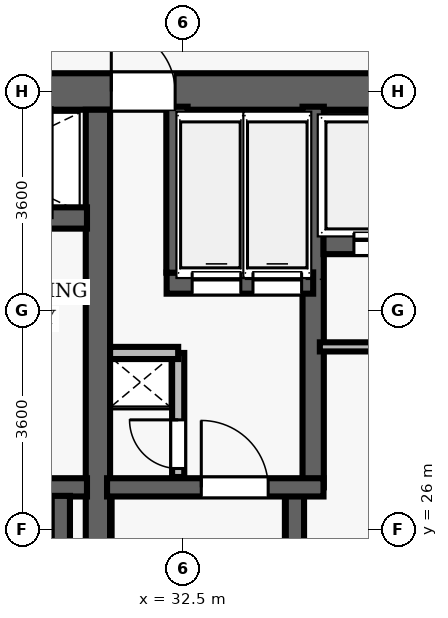
"""IFC4 building model, lengths in metres.
Left out: names, types, materials, properties, quantities, classifications, styles, units other than length and angle.
Written with IfcOpenShell. Run it as: python <this file> out.ifc"""

import sys

from ifc_helpers import new_model, si_unit, direction, frame, frame_2d, origin, place, context, subcontext, project, spatial, rectangle, extrude, element, fill, save


model = new_model("IFC4")
c1 = context("Model", 3, precision=1e-05, world=origin(), true_north=direction((0.0, 1.0)))
c2 = subcontext(c1, "Body", "Model", "MODEL_VIEW")
j1 = project(units=[si_unit("LENGTHUNIT", "METRE"), si_unit("PLANEANGLEUNIT", "RADIAN")], contexts=[c1])
p1 = place(None, origin())
s1 = spatial("IfcSite", under=j1, at=p1, CompositionType="ELEMENT")
p2 = place(p1, origin())
s2 = spatial("IfcBuilding", under=s1, at=p2, CompositionType="ELEMENT")
p3 = place(p2, frame((0.0, 0.0, 93.9)))
s3 = spatial("IfcBuildingStorey", under=s2, at=p3, CompositionType="ELEMENT", Elevation=93.9)
p4 = place(p3, frame((26.7, 33.2, 0.0), z_axis=(0.0, 0.0, 1.0), x_axis=(1.0, 0.0, 0.0)))
e1 = element("IfcWall", 1, at=p4, inside=s3, PredefinedType="SHEAR", context=c2, shape_type="SweptSolid", body=[
    extrude(rectangle(XDim=22.6, YDim=0.6, at=frame_2d((11.3, 0.0))), origin(), (0.0, 0.0, 1.0), 3.5),
])
p5 = place(p4, frame((4.62, 0.0, 0.0)))
e2 = element("IfcOpeningElement", 2, at=p5, cuts=e1, PredefinedType="OPENING", context=c2, shape_type="SweptSolid", body=[
    extrude(rectangle(XDim=1.05, YDim=2.15, at=frame_2d((0.525, 1.075))), frame((0.0, 0.31, 0.0), z_axis=(0.0, -1.0, 0.0), x_axis=(1.0, 0.0, 0.0)), (0.0, 0.0, 1.0), 0.62),
])
p6 = place(p4, frame((14.52, 0.0, 0.0)))
e3 = element("IfcOpeningElement", 3, at=p6, cuts=e1, PredefinedType="OPENING", context=c2, shape_type="SweptSolid", body=[
    extrude(rectangle(XDim=1.05, YDim=2.15, at=frame_2d((0.525, 1.075))), frame((0.0, 0.31, 0.0), z_axis=(0.0, -1.0, 0.0), x_axis=(1.0, 0.0, 0.0)), (0.0, 0.0, 1.0), 0.62),
])
p7 = place(p3, frame((31.1, 19.1, 0.0), z_axis=(0.0, 0.0, 1.0), x_axis=(0.0, 1.0, 0.0)))
e4 = element("IfcWall", 4, at=p7, inside=s3, PredefinedType="SHEAR", context=c2, shape_type="SweptSolid", body=[
    extrude(rectangle(XDim=13.8, YDim=0.4, at=frame_2d((6.9, 0.0))), origin(), (0.0, 0.0, 1.0), 3.5),
])
p8 = place(p3, frame((27.25, 26.69, 0.0), z_axis=(0.0, 0.0, 1.0), x_axis=(1.0, 0.0, 0.0)))
e5 = element("IfcWall", 5, at=p8, inside=s3, PredefinedType="SHEAR", context=c2, shape_type="SweptSolid", body=[
    extrude(rectangle(XDim=3.67, YDim=0.3, at=frame_2d((1.835, 0.0))), origin(), (0.0, 0.0, 1.0), 3.5),
])
p9 = place(p8, frame((1.05, 0.0, 0.0)))
e6 = element("IfcOpeningElement", 6, at=p9, cuts=e5, PredefinedType="OPENING", context=c2, shape_type="SweptSolid", body=[
    extrude(rectangle(XDim=1.1, YDim=2.15, at=frame_2d((0.55, 1.075))), frame((0.0, 0.16, 0.0), z_axis=(0.0, -1.0, 0.0), x_axis=(1.0, 0.0, 0.0)), (0.0, 0.0, 1.0), 0.32),
])
p10 = place(p3, frame((30.49, 19.05, 0.0), z_axis=(0.0, 0.0, 1.0), x_axis=(0.0, 1.0, 0.0)))
e7 = element("IfcWall", 7, at=p10, inside=s3, PredefinedType="SHEAR", context=c2, shape_type="SweptSolid", body=[
    extrude(rectangle(XDim=7.5, YDim=0.3, at=frame_2d((3.75, 0.0))), origin(), (0.0, 0.0, 1.0), 3.5),
])
p11 = place(p3, frame((27.25, 31.12, 0.0), z_axis=(0.0, 0.0, 1.0), x_axis=(1.0, 0.0, 0.0)))
e8 = element("IfcWall", 8, at=p11, inside=s3, PredefinedType="SHEAR", context=c2, shape_type="SweptSolid", body=[
    extrude(rectangle(XDim=3.67, YDim=0.35, at=frame_2d((1.835, 0.0))), origin(), (0.0, 0.0, 1.0), 2.5),
])
p12 = place(p11, frame((1.25, 0.0, 0.0)))
e9 = element("IfcOpeningElement", 9, at=p12, cuts=e8, PredefinedType="OPENING", context=c2, shape_type="SweptSolid", body=[
    extrude(rectangle(XDim=1.1, YDim=2.15, at=frame_2d((0.55, 1.075))), frame((0.0, 0.185, 0.0), z_axis=(0.0, -1.0, 0.0), x_axis=(1.0, 0.0, 0.0)), (0.0, 0.0, 1.0), 0.37),
])
p13 = place(p3, frame((34.34, 19.05, 0.0), z_axis=(0.0, 0.0, 1.0), x_axis=(0.0, 1.0, 0.0)))
e10 = element("IfcWall", 10, at=p13, inside=s3, PredefinedType="SHEAR", context=c2, shape_type="SweptSolid", body=[
    extrude(rectangle(XDim=7.5, YDim=0.3, at=frame_2d((3.75, 0.0))), origin(), (0.0, 0.0, 1.0), 3.5),
])
p14 = place(p3, frame((34.64, 26.69, 0.0), z_axis=(0.0, 0.0, 1.0), x_axis=(0.0, 1.0, 0.0)))
e11 = element("IfcWall", 11, at=p14, inside=s3, PredefinedType="SHEAR", context=c2, shape_type="SweptSolid", body=[
    extrude(rectangle(XDim=6.26, YDim=0.35, at=frame_2d((3.13, 0.0))), origin(), (0.0, 0.0, 1.0), 3.5),
])
p15 = place(p3, frame((31.25, 26.69, 0.0), z_axis=(0.0, 0.0, 1.0), x_axis=(1.0, 0.0, 0.0)))
e12 = element("IfcWall", 12, at=p15, inside=s3, PredefinedType="SHEAR", context=c2, shape_type="SweptSolid", body=[
    extrude(rectangle(XDim=3.56, YDim=0.3, at=frame_2d((1.78, 0.0))), origin(), (0.0, 0.0, 1.0), 3.5),
])
p16 = place(p15, frame((1.55, 0.0, 0.0)))
e13 = element("IfcOpeningElement", 13, at=p16, cuts=e12, PredefinedType="OPENING", context=c2, shape_type="SweptSolid", body=[
    extrude(rectangle(XDim=1.1, YDim=2.15, at=frame_2d((0.55, 1.075))), frame((0.0, 0.16, 0.0), z_axis=(0.0, -1.0, 0.0), x_axis=(1.0, 0.0, 0.0)), (0.0, 0.0, 1.0), 0.32),
])
p17 = place(p3, frame((32.23, 30.05, 0.0), z_axis=(0.0, 0.0, 1.0), x_axis=(1.0, 0.0, 0.0)))
e14 = element("IfcWall", 14, at=p17, inside=s3, PredefinedType="SHEAR", context=c2, shape_type="SweptSolid", body=[
    extrude(rectangle(XDim=2.41, YDim=0.35, at=frame_2d((1.205, 0.0))), origin(), (0.0, 0.0, 1.0), 2.5),
])
p18 = place(p17, frame((0.42, 0.0, 0.0)))
e15 = element("IfcOpeningElement", 15, at=p18, cuts=e14, PredefinedType="OPENING", context=c2, shape_type="SweptSolid", body=[
    extrude(rectangle(XDim=0.8, YDim=2.15, at=frame_2d((0.4, 1.075))), frame((0.0, 0.185, 0.0), z_axis=(0.0, -1.0, 0.0), x_axis=(1.0, 0.0, 0.0)), (0.0, 0.0, 1.0), 0.37),
])
p19 = place(p17, frame((1.42, 0.0, 0.0)))
e16 = element("IfcOpeningElement", 16, at=p19, cuts=e14, PredefinedType="OPENING", context=c2, shape_type="SweptSolid", body=[
    extrude(rectangle(XDim=0.8, YDim=2.15, at=frame_2d((0.4, 1.075))), frame((0.0, 0.185, 0.0), z_axis=(0.0, -1.0, 0.0), x_axis=(1.0, 0.0, 0.0)), (0.0, 0.0, 1.0), 0.37),
])
p20 = place(p3, frame((32.4, 30.22, 0.0), z_axis=(0.0, 0.0, 1.0), x_axis=(0.0, 1.0, 0.0)))
e17 = element("IfcWall", 17, at=p20, inside=s3, PredefinedType="SHEAR", context=c2, shape_type="SweptSolid", body=[
    extrude(rectangle(XDim=2.73, YDim=0.35, at=frame_2d((1.365, 0.0))), origin(), (0.0, 0.0, 1.0), 2.5),
])
p21 = place(p3, frame((32.42, 26.86, 0.0), z_axis=(0.0, 0.0, 1.0), x_axis=(0.0, 1.0, 0.0)))
e18 = element("IfcWall", 18, at=p21, inside=s3, PredefinedType="PARTITIONING", context=c2, shape_type="SweptSolid", body=[
    extrude(rectangle(XDim=2.04, YDim=0.2, at=frame_2d((1.02, 0.0))), origin(), (0.0, 0.0, 1.0), 2.5),
])
p22 = place(p21, frame((0.14, 0.0, 0.0)))
e19 = element("IfcOpeningElement", 19, at=p22, cuts=e18, PredefinedType="OPENING", context=c2, shape_type="SweptSolid", body=[
    extrude(rectangle(XDim=0.8, YDim=2.05, at=frame_2d((0.4, 1.025))), frame((0.0, 0.11, 0.0), z_axis=(0.0, -1.0, 0.0), x_axis=(1.0, 0.0, 0.0)), (0.0, 0.0, 1.0), 0.22),
])
p23 = place(p3, frame((31.3, 28.9, 0.0), z_axis=(0.0, 0.0, 1.0), x_axis=(1.0, 0.0, 0.0)))
e20 = element("IfcWall", 20, at=p23, inside=s3, PredefinedType="PARTITIONING", context=c2, shape_type="SweptSolid", body=[
    extrude(rectangle(XDim=1.12, YDim=0.2, at=frame_2d((0.56, 0.0))), origin(), (0.0, 0.0, 1.0), 2.5),
])
p24 = place(p3, frame((34.81, 30.7, 0.0), z_axis=(0.0, 0.0, 1.0), x_axis=(1.0, 0.0, 0.0)))
e21 = element("IfcWall", 21, at=p24, inside=s3, PredefinedType="SHEAR", context=c2, shape_type="SweptSolid", body=[
    extrude(rectangle(XDim=6.36, YDim=0.35, at=frame_2d((3.18, 0.0))), origin(), (0.0, 0.0, 1.0), 2.5),
])
p25 = place(p24, frame((0.5, 0.0, 0.0)))
e22 = element("IfcOpeningElement", 22, at=p25, cuts=e21, PredefinedType="OPENING", context=c2, shape_type="SweptSolid", body=[
    extrude(rectangle(XDim=0.9, YDim=2.15, at=frame_2d((0.45, 1.075))), frame((0.0, 0.185, 0.0), z_axis=(0.0, -1.0, 0.0), x_axis=(1.0, 0.0, 0.0)), (0.0, 0.0, 1.0), 0.37),
])
p26 = place(p24, frame((2.58, 0.0, 0.0)))
e23 = element("IfcOpeningElement", 23, at=p26, cuts=e21, PredefinedType="OPENING", context=c2, shape_type="SweptSolid", body=[
    extrude(rectangle(XDim=0.9, YDim=2.15, at=frame_2d((0.45, 1.075))), frame((0.0, 0.185, 0.0), z_axis=(0.0, -1.0, 0.0), x_axis=(1.0, 0.0, 0.0)), (0.0, 0.0, 1.0), 0.37),
])
p27 = place(p24, frame((4.66, 0.0, 0.0)))
e24 = element("IfcOpeningElement", 24, at=p27, cuts=e21, PredefinedType="OPENING", context=c2, shape_type="SweptSolid", body=[
    extrude(rectangle(XDim=0.9, YDim=2.15, at=frame_2d((0.45, 1.075))), frame((0.0, 0.185, 0.0), z_axis=(0.0, -1.0, 0.0), x_axis=(1.0, 0.0, 0.0)), (0.0, 0.0, 1.0), 0.37),
])
p28 = place(p3, frame((34.75, 29.0, 0.0), z_axis=(0.0, 0.0, 1.0), x_axis=(1.0, 0.0, 0.0)))
e25 = element("IfcWall", 25, at=p28, inside=s3, PredefinedType="PARTITIONING", context=c2, shape_type="SweptSolid", body=[
    extrude(rectangle(XDim=6.25, YDim=0.15, at=frame_2d((3.125, 0.0))), origin(), (0.0, 0.0, 1.0), 2.5),
])
p29 = place(p16, origin())
e26 = element("IfcDoor", 26, at=p29, inside=s3, OperationType="SINGLE_SWING_LEFT", PredefinedType="DOOR", context=c2, shape_type="SweptSolid", body=[
    extrude(rectangle(XDim=1.1, YDim=2.15, at=frame_2d((0.55, 1.075))), frame((0.0, 0.025, 0.0), z_axis=(0.0, -1.0, 0.0), x_axis=(1.0, 0.0, 0.0)), (0.0, 0.0, 1.0), 0.05),
])
fill(e13, e26)
p30 = place(p22, origin())
e27 = element("IfcDoor", 27, at=p30, inside=s3, OperationType="SINGLE_SWING_RIGHT", PredefinedType="DOOR", context=c2, shape_type="SweptSolid", body=[
    extrude(rectangle(XDim=0.8, YDim=2.05, at=frame_2d((0.4, 1.025))), frame((0.0, 0.025, 0.0), z_axis=(0.0, -1.0, 0.0), x_axis=(1.0, 0.0, 0.0)), (0.0, 0.0, 1.0), 0.05),
])
fill(e19, e27)
p31 = place(p5, origin())
e28 = element("IfcDoor", 28, at=p31, inside=s3, OperationType="SINGLE_SWING_LEFT", PredefinedType="DOOR", context=c2, shape_type="SweptSolid", body=[
    extrude(rectangle(XDim=1.05, YDim=2.15, at=frame_2d((0.525, 1.075))), frame((0.0, 0.025, 0.0), z_axis=(0.0, -1.0, 0.0), x_axis=(1.0, 0.0, 0.0)), (0.0, 0.0, 1.0), 0.05),
])
fill(e2, e28)
p32 = place(p25, origin())
e29 = element("IfcDoor", 29, at=p32, inside=s3, OperationType="SLIDING_TO_LEFT", PredefinedType="DOOR", context=c2, shape_type="SweptSolid", body=[
    extrude(rectangle(XDim=0.9, YDim=2.15, at=frame_2d((0.45, 1.075))), frame((0.0, 0.025, 0.0), z_axis=(0.0, -1.0, 0.0), x_axis=(1.0, 0.0, 0.0)), (0.0, 0.0, 1.0), 0.05),
])
fill(e22, e29)
p33 = place(p18, origin())
e30 = element("IfcDoor", 30, at=p33, inside=s3, OperationType="SLIDING_TO_LEFT", PredefinedType="DOOR", context=c2, shape_type="SweptSolid", body=[
    extrude(rectangle(XDim=0.8, YDim=2.15, at=frame_2d((0.4, 1.075))), frame((0.0, 0.025, 0.0), z_axis=(0.0, -1.0, 0.0), x_axis=(1.0, 0.0, 0.0)), (0.0, 0.0, 1.0), 0.05),
])
fill(e15, e30)
p34 = place(p19, origin())
e31 = element("IfcDoor", 31, at=p34, inside=s3, OperationType="SLIDING_TO_LEFT", PredefinedType="DOOR", context=c2, shape_type="SweptSolid", body=[
    extrude(rectangle(XDim=0.8, YDim=2.15, at=frame_2d((0.4, 1.075))), frame((0.0, 0.025, 0.0), z_axis=(0.0, -1.0, 0.0), x_axis=(1.0, 0.0, 0.0)), (0.0, 0.0, 1.0), 0.05),
])
fill(e16, e31)
save(model, sys.argv[1])
